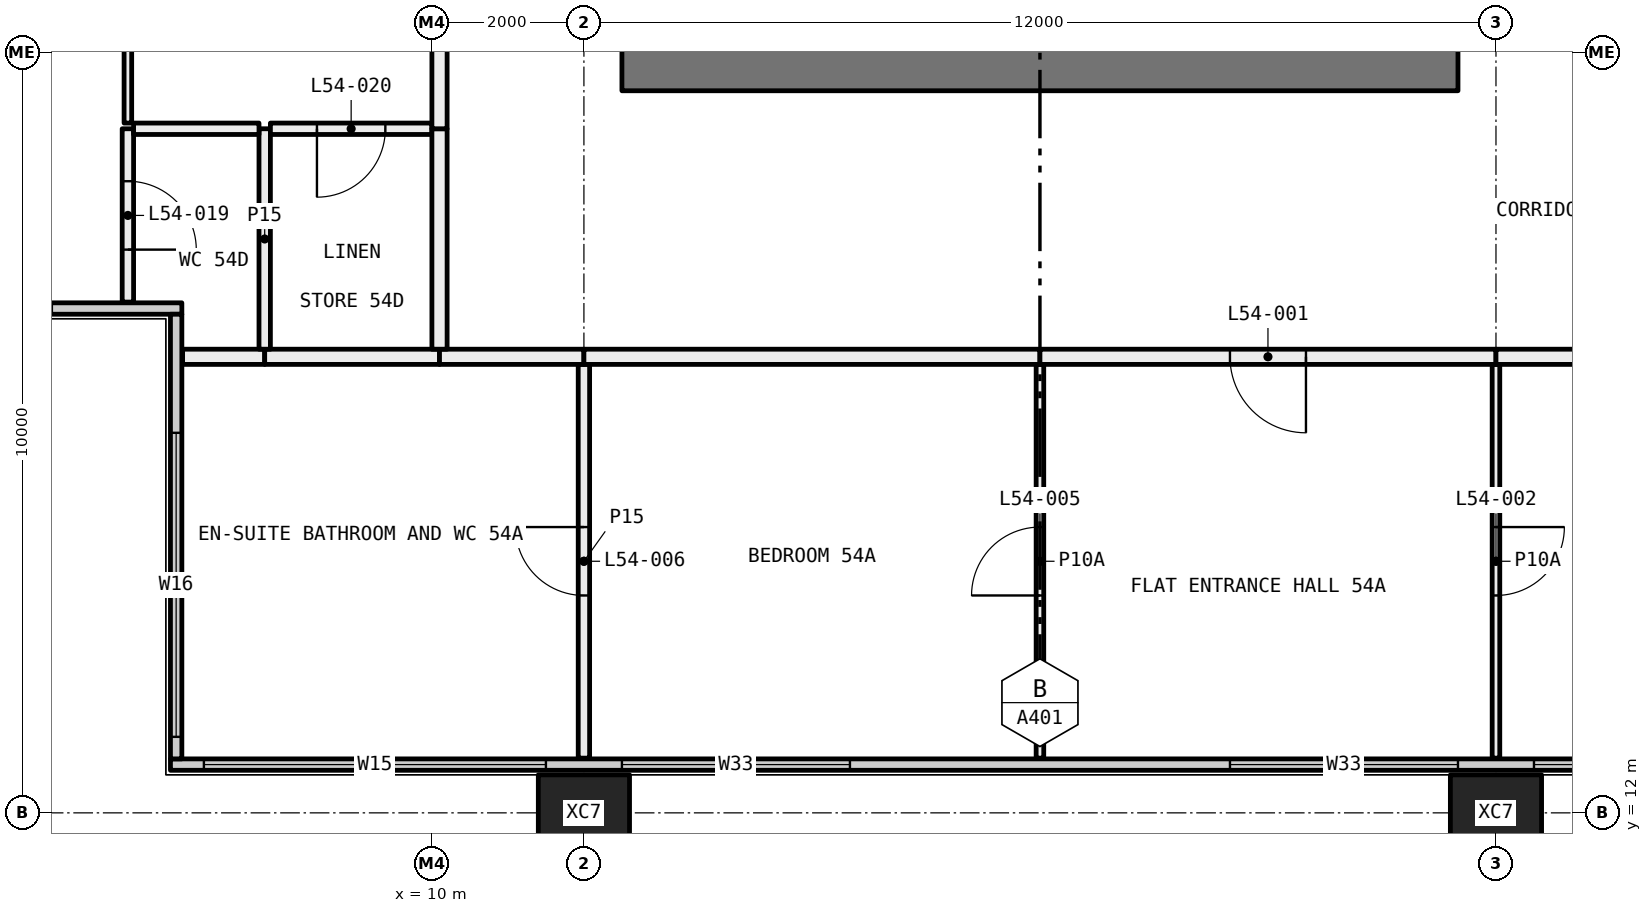
"""IFC4 building model, lengths in metres.
Left out: names, types, materials, properties, quantities, classifications, styles, units other than length and angle.
Written with IfcOpenShell. Run it as: python <this file> out.ifc"""

import sys

from ifc_helpers import new_model, si_unit, direction, frame, frame_2d, origin, origin_2d, place, context, subcontext, project, spatial, rectangle, hollow_rectangle, extrude, element, fill, save


model = new_model("IFC4")
c1 = context("Model", 3, precision=1e-05, world=origin(), true_north=direction((0.0, 1.0)))
c2 = subcontext(c1, "Body", "Model", "MODEL_VIEW")
j1 = project(units=[si_unit("LENGTHUNIT", "METRE"), si_unit("PLANEANGLEUNIT", "RADIAN")], contexts=[c1])
p1 = place(None, origin())
s1 = spatial("IfcSite", under=j1, at=p1, CompositionType="ELEMENT")
p2 = place(p1, origin())
s2 = spatial("IfcBuilding", under=s1, at=p2, CompositionType="ELEMENT")
p3 = place(p2, frame((0.0, 0.0, 203.1)))
s3 = spatial("IfcBuildingStorey", under=s2, at=p3, CompositionType="ELEMENT", Elevation=203.1)
for number, where, z_axis, x_axis in (
    (1, (12.0, 12.0, -0.4), (0.0, 0.0, 1.0), (1.0, 0.0, 0.0)),
    (2, (24.0, 12.0, -0.4), (0.0, 0.0, 1.0), (1.0, 0.0, 0.0)),
):
    element("IfcColumn", number, at=place(p3, frame(where, z_axis=z_axis, x_axis=x_axis)), inside=s3, PredefinedType="COLUMN", context=c2, shape_type="SweptSolid", body=[
        extrude(hollow_rectangle(XDim=1.2, YDim=1.0, WallThickness=0.045, at=origin_2d()), origin(), (0.0, 0.0, 1.0), 3.45),
    ])
p4 = place(p3, frame((6.56, 12.635, 0.0), z_axis=(0.0, 0.0, 1.0), x_axis=(1.0, 0.0, 0.0)))
e3 = element("IfcWall", 3, at=p4, inside=s3, PredefinedType="ELEMENTEDWALL", context=c2, shape_type="SweptSolid", body=[
    extrude(rectangle(XDim=46.88, YDim=0.15, at=frame_2d((23.44, 0.0))), origin(), (0.0, 0.0, 1.0), 3.05),
])
p5 = place(p4, frame((0.44, 0.0, 0.45)))
e4 = element("IfcOpeningElement", 4, at=p5, cuts=e3, PredefinedType="OPENING", context=c2, shape_type="SweptSolid", body=[
    extrude(rectangle(XDim=4.5, YDim=2.55, at=frame_2d((2.25, 1.275))), frame((0.0, 0.085, 0.0), z_axis=(0.0, -1.0, 0.0), x_axis=(1.0, 0.0, 0.0)), (0.0, 0.0, 1.0), 0.17),
])
p6 = place(p4, frame((5.94, 0.0, 0.45)))
e5 = element("IfcOpeningElement", 5, at=p6, cuts=e3, PredefinedType="OPENING", context=c2, shape_type="SweptSolid", body=[
    extrude(rectangle(XDim=3.0, YDim=2.55, at=frame_2d((1.5, 1.275))), frame((0.0, 0.085, 0.0), z_axis=(0.0, -1.0, 0.0), x_axis=(1.0, 0.0, 0.0)), (0.0, 0.0, 1.0), 0.17),
])
p7 = place(p4, frame((13.94, 0.0, 0.45)))
e6 = element("IfcOpeningElement", 6, at=p7, cuts=e3, PredefinedType="OPENING", context=c2, shape_type="SweptSolid", body=[
    extrude(rectangle(XDim=3.0, YDim=2.55, at=frame_2d((1.5, 1.275))), frame((0.0, 0.085, 0.0), z_axis=(0.0, -1.0, 0.0), x_axis=(1.0, 0.0, 0.0)), (0.0, 0.0, 1.0), 0.17),
])
p8 = place(p4, frame((17.94, 0.0, 0.45)))
e7 = element("IfcOpeningElement", 7, at=p8, cuts=e3, PredefinedType="OPENING", context=c2, shape_type="SweptSolid", body=[
    extrude(rectangle(XDim=3.0, YDim=2.55, at=frame_2d((1.5, 1.275))), frame((0.0, 0.085, 0.0), z_axis=(0.0, -1.0, 0.0), x_axis=(1.0, 0.0, 0.0)), (0.0, 0.0, 1.0), 0.17),
])
p9 = place(p4, frame((26.94, 0.0, 0.45)))
e8 = element("IfcOpeningElement", 8, at=p9, cuts=e3, PredefinedType="OPENING", context=c2, shape_type="SweptSolid", body=[
    extrude(rectangle(XDim=2.0, YDim=2.55, at=frame_2d((1.0, 1.275))), frame((0.0, 0.085, 0.0), z_axis=(0.0, -1.0, 0.0), x_axis=(1.0, 0.0, 0.0)), (0.0, 0.0, 1.0), 0.17),
])
p10 = place(p4, frame((29.94, 0.0, 0.45)))
e9 = element("IfcOpeningElement", 9, at=p10, cuts=e3, PredefinedType="OPENING", context=c2, shape_type="SweptSolid", body=[
    extrude(rectangle(XDim=3.0, YDim=2.55, at=frame_2d((1.5, 1.275))), frame((0.0, 0.085, 0.0), z_axis=(0.0, -1.0, 0.0), x_axis=(1.0, 0.0, 0.0)), (0.0, 0.0, 1.0), 0.17),
])
p11 = place(p4, frame((37.94, 0.0, 0.45)))
e10 = element("IfcOpeningElement", 10, at=p11, cuts=e3, PredefinedType="OPENING", context=c2, shape_type="SweptSolid", body=[
    extrude(rectangle(XDim=3.0, YDim=2.55, at=frame_2d((1.5, 1.275))), frame((0.0, 0.085, 0.0), z_axis=(0.0, -1.0, 0.0), x_axis=(1.0, 0.0, 0.0)), (0.0, 0.0, 1.0), 0.17),
])
p12 = place(p4, frame((41.94, 0.0, 0.45)))
e11 = element("IfcOpeningElement", 11, at=p12, cuts=e3, PredefinedType="OPENING", context=c2, shape_type="SweptSolid", body=[
    extrude(rectangle(XDim=4.5, YDim=2.55, at=frame_2d((2.25, 1.275))), frame((0.0, 0.085, 0.0), z_axis=(0.0, -1.0, 0.0), x_axis=(1.0, 0.0, 0.0)), (0.0, 0.0, 1.0), 0.17),
])
p13 = place(p3, frame((0.56, 18.635, 0.0), z_axis=(0.0, 0.0, 1.0), x_axis=(1.0, 0.0, 0.0)))
e12 = element("IfcWall", 12, at=p13, inside=s3, PredefinedType="ELEMENTEDWALL", context=c2, shape_type="SweptSolid", body=[
    extrude(rectangle(XDim=6.15, YDim=0.15, at=frame_2d((3.075, 0.0))), origin(), (0.0, 0.0, 1.0), 3.05),
])
p14 = place(p13, frame((0.44, 0.0, 0.45)))
e13 = element("IfcOpeningElement", 13, at=p14, cuts=e12, PredefinedType="OPENING", context=c2, shape_type="SweptSolid", body=[
    extrude(rectangle(XDim=4.0, YDim=2.55, at=frame_2d((2.0, 1.275))), frame((0.0, 0.085, 0.0), z_axis=(0.0, -1.0, 0.0), x_axis=(1.0, 0.0, 0.0)), (0.0, 0.0, 1.0), 0.17),
])
p15 = place(p3, frame((6.635, 12.71, 0.0), z_axis=(0.0, 0.0, 1.0), x_axis=(0.0, 1.0, 0.0)))
e14 = element("IfcWall", 14, at=p15, inside=s3, PredefinedType="ELEMENTEDWALL", context=c2, shape_type="SweptSolid", body=[
    extrude(rectangle(XDim=5.85, YDim=0.15, at=frame_2d((2.925, 0.0))), origin(), (0.0, 0.0, 1.0), 3.05),
])
p16 = place(p15, frame((0.29, 0.0, 0.45)))
e15 = element("IfcOpeningElement", 15, at=p16, cuts=e14, PredefinedType="OPENING", context=c2, shape_type="SweptSolid", body=[
    extrude(rectangle(XDim=4.0, YDim=2.55, at=frame_2d((2.0, 1.275))), frame((0.0, 0.085, 0.0), z_axis=(0.0, -1.0, 0.0), x_axis=(1.0, 0.0, 0.0)), (0.0, 0.0, 1.0), 0.17),
])
p17 = place(p3, frame((12.0, 12.72, 0.0), z_axis=(0.0, 0.0, 1.0), x_axis=(0.0, 1.0, 0.0)))
e16 = element("IfcWall", 16, at=p17, inside=s3, PredefinedType="PARTITIONING", context=c2, shape_type="SweptSolid", body=[
    extrude(rectangle(XDim=5.18, YDim=0.15, at=frame_2d((2.59, 0.0))), origin(), (0.0, 0.0, 1.0), 3.05),
])
p18 = place(p17, frame((2.14, 0.0, 0.0)))
e17 = element("IfcOpeningElement", 17, at=p18, cuts=e16, PredefinedType="OPENING", context=c2, shape_type="SweptSolid", body=[
    extrude(rectangle(XDim=0.9, YDim=2.1, at=frame_2d((0.45, 1.05))), frame((0.0, 0.085, 0.0), z_axis=(0.0, -1.0, 0.0), x_axis=(1.0, 0.0, 0.0)), (0.0, 0.0, 1.0), 0.17),
])
p19 = place(p3, frame((7.8, 18.0, 0.0), z_axis=(0.0, 0.0, 1.0), x_axis=(-1.0, 0.0, 0.0)))
e18 = element("IfcWall", 18, at=p19, inside=s3, PredefinedType="PARTITIONING", context=c2, shape_type="SweptSolid", body=[
    extrude(rectangle(XDim=1.08, YDim=0.2, at=frame_2d((0.54, 0.0))), origin(), (0.0, 0.0, 1.0), 3.05),
])
p20 = place(p3, frame((10.1, 18.0, 0.0), z_axis=(0.0, 0.0, 1.0), x_axis=(-1.0, 0.0, 0.0)))
e19 = element("IfcWall", 19, at=p20, inside=s3, PredefinedType="PARTITIONING", context=c2, shape_type="SweptSolid", body=[
    extrude(rectangle(XDim=2.3, YDim=0.2, at=frame_2d((1.15, 0.0))), origin(), (0.0, 0.0, 1.0), 3.05),
])
p21 = place(p3, frame((12.0, 18.0, 0.0), z_axis=(0.0, 0.0, 1.0), x_axis=(-1.0, 0.0, 0.0)))
e20 = element("IfcWall", 20, at=p21, inside=s3, PredefinedType="PARTITIONING", context=c2, shape_type="SweptSolid", body=[
    extrude(rectangle(XDim=1.9, YDim=0.2, at=frame_2d((0.95, 0.0))), origin(), (0.0, 0.0, 1.0), 3.05),
])
p22 = place(p3, frame((18.0, 12.72, 0.0), z_axis=(0.0, 0.0, 1.0), x_axis=(0.0, 1.0, 0.0)))
e21 = element("IfcWall", 21, at=p22, inside=s3, PredefinedType="PARTITIONING", context=c2, shape_type="SweptSolid", body=[
    extrude(rectangle(XDim=5.18, YDim=0.1, at=frame_2d((2.59, 0.0))), origin(), (0.0, 0.0, 1.0), 3.05),
])
p23 = place(p22, frame((2.14, 0.0, 0.0)))
e22 = element("IfcOpeningElement", 22, at=p23, cuts=e21, PredefinedType="OPENING", context=c2, shape_type="SweptSolid", body=[
    extrude(rectangle(XDim=0.9, YDim=2.1, at=frame_2d((0.45, 1.05))), frame((0.0, 0.06, 0.0), z_axis=(0.0, -1.0, 0.0), x_axis=(1.0, 0.0, 0.0)), (0.0, 0.0, 1.0), 0.12),
])
p24 = place(p3, frame((18.0, 18.0, 0.0), z_axis=(0.0, 0.0, 1.0), x_axis=(-1.0, 0.0, 0.0)))
e23 = element("IfcWall", 23, at=p24, inside=s3, PredefinedType="PARTITIONING", context=c2, shape_type="SweptSolid", body=[
    extrude(rectangle(XDim=6.0, YDim=0.2, at=frame_2d((3.0, 0.0))), origin(), (0.0, 0.0, 1.0), 3.05),
])
p25 = place(p3, frame((24.0, 12.72, 0.0), z_axis=(0.0, 0.0, 1.0), x_axis=(0.0, 1.0, 0.0)))
e24 = element("IfcWall", 24, at=p25, inside=s3, PredefinedType="PARTITIONING", context=c2, shape_type="SweptSolid", body=[
    extrude(rectangle(XDim=5.18, YDim=0.1, at=frame_2d((2.59, 0.0))), origin(), (0.0, 0.0, 1.0), 3.05),
])
p26 = place(p25, frame((2.14, 0.0, 0.0)))
e25 = element("IfcOpeningElement", 25, at=p26, cuts=e24, PredefinedType="OPENING", context=c2, shape_type="SweptSolid", body=[
    extrude(rectangle(XDim=0.9, YDim=2.1, at=frame_2d((0.45, 1.05))), frame((0.0, 0.06, 0.0), z_axis=(0.0, -1.0, 0.0), x_axis=(1.0, 0.0, 0.0)), (0.0, 0.0, 1.0), 0.12),
])
p27 = place(p3, frame((24.0, 18.0, 0.0), z_axis=(0.0, 0.0, 1.0), x_axis=(-1.0, 0.0, 0.0)))
e26 = element("IfcWall", 26, at=p27, inside=s3, PredefinedType="PARTITIONING", context=c2, shape_type="SweptSolid", body=[
    extrude(rectangle(XDim=6.0, YDim=0.2, at=frame_2d((3.0, 0.0))), origin(), (0.0, 0.0, 1.0), 3.05),
])
p28 = place(p27, frame((2.5, 0.0, 0.0)))
e27 = element("IfcOpeningElement", 27, at=p28, cuts=e26, PredefinedType="OPENING", context=c2, shape_type="SweptSolid", body=[
    extrude(rectangle(XDim=1.0, YDim=2.1, at=frame_2d((0.5, 1.05))), frame((0.0, 0.11, 0.0), z_axis=(0.0, -1.0, 0.0), x_axis=(1.0, 0.0, 0.0)), (0.0, 0.0, 1.0), 0.22),
])
p29 = place(p3, frame((36.0, 18.0, 0.0), z_axis=(0.0, 0.0, 1.0), x_axis=(-1.0, 0.0, 0.0)))
e28 = element("IfcWall", 28, at=p29, inside=s3, PredefinedType="PARTITIONING", context=c2, shape_type="SweptSolid", body=[
    extrude(rectangle(XDim=12.0, YDim=0.2, at=frame_2d((6.0, 0.0))), origin(), (0.0, 0.0, 1.0), 2.45),
])
p30 = place(p3, frame((6.0, 18.72, 0.0), z_axis=(0.0, 0.0, 1.0), x_axis=(0.0, 1.0, 0.0)))
e29 = element("IfcWall", 29, at=p30, inside=s3, PredefinedType="PARTITIONING", context=c2, shape_type="SweptSolid", body=[
    extrude(rectangle(XDim=2.28, YDim=0.15, at=frame_2d((1.14, 0.0))), origin(), (0.0, 0.0, 1.0), 3.05),
])
p31 = place(p30, frame((0.69, 0.0, 0.0)))
e30 = element("IfcOpeningElement", 30, at=p31, cuts=e29, PredefinedType="OPENING", context=c2, shape_type="SweptSolid", body=[
    extrude(rectangle(XDim=0.9, YDim=2.1, at=frame_2d((0.45, 1.05))), frame((0.0, 0.085, 0.0), z_axis=(0.0, -1.0, 0.0), x_axis=(1.0, 0.0, 0.0)), (0.0, 0.0, 1.0), 0.17),
])
p32 = place(p3, frame((6.0, 21.075, 0.0), z_axis=(0.0, 0.0, 1.0), x_axis=(0.0, 1.0, 0.0)))
e31 = element("IfcWall", 31, at=p32, inside=s3, PredefinedType="PARTITIONING", context=c2, shape_type="SweptSolid", body=[
    extrude(rectangle(XDim=3.025, YDim=0.1, at=frame_2d((1.513, 0.0))), origin(), (0.0, 0.0, 1.0), 2.45),
])
p33 = place(p3, frame((7.8, 18.1, 0.0), z_axis=(0.0, 0.0, 1.0), x_axis=(0.0, 1.0, 0.0)))
e32 = element("IfcWall", 32, at=p33, inside=s3, PredefinedType="PARTITIONING", context=c2, shape_type="SweptSolid", body=[
    extrude(rectangle(XDim=2.9, YDim=0.15, at=frame_2d((1.45, 0.0))), origin(), (0.0, 0.0, 1.0), 3.05),
])
p34 = place(p3, frame((7.725, 21.0, 0.0), z_axis=(0.0, 0.0, 1.0), x_axis=(-1.0, 0.0, 0.0)))
e33 = element("IfcWall", 33, at=p34, inside=s3, PredefinedType="PARTITIONING", context=c2, shape_type="SweptSolid", body=[
    extrude(rectangle(XDim=1.65, YDim=0.15, at=frame_2d((0.825, 0.0))), origin(), (0.0, 0.0, 1.0), 3.05),
])
p35 = place(p3, frame((10.0, 21.0, 0.0), z_axis=(0.0, 0.0, 1.0), x_axis=(-1.0, 0.0, 0.0)))
e34 = element("IfcWall", 34, at=p35, inside=s3, PredefinedType="PARTITIONING", context=c2, shape_type="SweptSolid", body=[
    extrude(rectangle(XDim=2.125, YDim=0.15, at=frame_2d((1.062, 0.0))), origin(), (0.0, 0.0, 1.0), 3.05),
])
p36 = place(p35, frame((0.613, 0.0, 0.0)))
e35 = element("IfcOpeningElement", 35, at=p36, cuts=e34, PredefinedType="OPENING", context=c2, shape_type="SweptSolid", body=[
    extrude(rectangle(XDim=0.9, YDim=2.1, at=frame_2d((0.45, 1.05))), frame((0.0, 0.085, 0.0), z_axis=(0.0, -1.0, 0.0), x_axis=(1.0, 0.0, 0.0)), (0.0, 0.0, 1.0), 0.17),
])
p37 = place(p3, frame((10.1, 18.1, 0.0), z_axis=(0.0, 0.0, 1.0), x_axis=(0.0, 1.0, 0.0)))
e36 = element("IfcWall", 36, at=p37, inside=s3, PredefinedType="PARTITIONING", context=c2, shape_type="SweptSolid", body=[
    extrude(rectangle(XDim=2.9, YDim=0.2, at=frame_2d((1.45, 0.0))), origin(), (0.0, 0.0, 1.0), 3.05),
])
p38 = place(p3, frame((10.1, 21.0, 0.0), z_axis=(0.0, 0.0, 1.0), x_axis=(0.0, 1.0, 0.0)))
e37 = element("IfcWall", 37, at=p38, inside=s3, PredefinedType="PARTITIONING", context=c2, shape_type="SweptSolid", body=[
    extrude(rectangle(XDim=3.1, YDim=0.2, at=frame_2d((1.55, 0.0))), origin(), (0.0, 0.0, 1.0), 2.45),
])
p39 = place(p3, frame((12.5, 21.775, 0.0), z_axis=(0.0, 0.0, 1.0), x_axis=(1.0, 0.0, 0.0)))
e38 = element("IfcWall", 38, at=p39, inside=s3, PredefinedType="SHEAR", context=c2, shape_type="SweptSolid", body=[
    extrude(rectangle(XDim=11.0, YDim=0.55, at=frame_2d((5.5, 0.0))), origin(), (0.0, 0.0, 1.0), 3.05),
])
p40 = place(p5, origin())
e39 = element("IfcWindow", 39, at=p40, inside=s3, PartitioningType="SINGLE_PANEL", PredefinedType="WINDOW", context=c2, shape_type="SweptSolid", body=[
    extrude(rectangle(XDim=4.5, YDim=2.55, at=frame_2d((2.25, 1.275))), frame((0.0, 0.03, 0.0), z_axis=(0.0, -1.0, 0.0), x_axis=(1.0, 0.0, 0.0)), (0.0, 0.0, 1.0), 0.06),
])
fill(e4, e39)
p41 = place(p6, origin())
e40 = element("IfcWindow", 40, at=p41, inside=s3, PartitioningType="SINGLE_PANEL", PredefinedType="WINDOW", context=c2, shape_type="SweptSolid", body=[
    extrude(rectangle(XDim=3.0, YDim=2.55, at=frame_2d((1.5, 1.275))), frame((0.0, 0.03, 0.0), z_axis=(0.0, -1.0, 0.0), x_axis=(1.0, 0.0, 0.0)), (0.0, 0.0, 1.0), 0.06),
])
fill(e5, e40)
p42 = place(p7, origin())
e41 = element("IfcWindow", 41, at=p42, inside=s3, PartitioningType="SINGLE_PANEL", PredefinedType="WINDOW", context=c2, shape_type="SweptSolid", body=[
    extrude(rectangle(XDim=3.0, YDim=2.55, at=frame_2d((1.5, 1.275))), frame((0.0, 0.03, 0.0), z_axis=(0.0, -1.0, 0.0), x_axis=(1.0, 0.0, 0.0)), (0.0, 0.0, 1.0), 0.06),
])
fill(e6, e41)
p43 = place(p8, origin())
e42 = element("IfcWindow", 42, at=p43, inside=s3, PartitioningType="SINGLE_PANEL", PredefinedType="WINDOW", context=c2, shape_type="SweptSolid", body=[
    extrude(rectangle(XDim=3.0, YDim=2.55, at=frame_2d((1.5, 1.275))), frame((0.0, 0.03, 0.0), z_axis=(0.0, -1.0, 0.0), x_axis=(1.0, 0.0, 0.0)), (0.0, 0.0, 1.0), 0.06),
])
fill(e7, e42)
p44 = place(p16, origin())
e43 = element("IfcWindow", 43, at=p44, inside=s3, PartitioningType="SINGLE_PANEL", PredefinedType="WINDOW", context=c2, shape_type="SweptSolid", body=[
    extrude(rectangle(XDim=4.0, YDim=2.55, at=frame_2d((2.0, 1.275))), frame((0.0, 0.03, 0.0), z_axis=(0.0, -1.0, 0.0), x_axis=(1.0, 0.0, 0.0)), (0.0, 0.0, 1.0), 0.06),
])
fill(e15, e43)
p45 = place(p28, origin())
e44 = element("IfcDoor", 44, at=p45, inside=s3, OperationType="SINGLE_SWING_RIGHT", PredefinedType="DOOR", context=c2, shape_type="SweptSolid", body=[
    extrude(rectangle(XDim=1.0, YDim=2.1, at=frame_2d((0.5, 1.05))), frame((0.0, 0.025, 0.0), z_axis=(0.0, -1.0, 0.0), x_axis=(1.0, 0.0, 0.0)), (0.0, 0.0, 1.0), 0.05),
])
fill(e27, e44)
p46 = place(p26, frame((0.9, 0.0, 0.0), x_axis=(-1.0, 0.0, 0.0)))
e45 = element("IfcDoor", 45, at=p46, inside=s3, OperationType="SINGLE_SWING_RIGHT", PredefinedType="DOOR", context=c2, shape_type="SweptSolid", body=[
    extrude(rectangle(XDim=0.9, YDim=2.1, at=frame_2d((0.45, 1.05))), frame((0.0, 0.025, 0.0), z_axis=(0.0, -1.0, 0.0), x_axis=(1.0, 0.0, 0.0)), (0.0, 0.0, 1.0), 0.05),
])
fill(e25, e45)
p47 = place(p23, origin())
e46 = element("IfcDoor", 46, at=p47, inside=s3, OperationType="SINGLE_SWING_RIGHT", PredefinedType="DOOR", context=c2, shape_type="SweptSolid", body=[
    extrude(rectangle(XDim=0.9, YDim=2.1, at=frame_2d((0.45, 1.05))), frame((0.0, 0.025, 0.0), z_axis=(0.0, -1.0, 0.0), x_axis=(1.0, 0.0, 0.0)), (0.0, 0.0, 1.0), 0.05),
])
fill(e22, e46)
p48 = place(p18, origin())
e47 = element("IfcDoor", 47, at=p48, inside=s3, OperationType="SINGLE_SWING_LEFT", PredefinedType="DOOR", context=c2, shape_type="SweptSolid", body=[
    extrude(rectangle(XDim=0.9, YDim=2.1, at=frame_2d((0.45, 1.05))), frame((0.0, 0.025, 0.0), z_axis=(0.0, -1.0, 0.0), x_axis=(1.0, 0.0, 0.0)), (0.0, 0.0, 1.0), 0.05),
])
fill(e17, e47)
p49 = place(p31, frame((0.9, 0.0, 0.0), x_axis=(-1.0, 0.0, 0.0)))
e48 = element("IfcDoor", 48, at=p49, inside=s3, OperationType="SINGLE_SWING_LEFT", PredefinedType="DOOR", context=c2, shape_type="SweptSolid", body=[
    extrude(rectangle(XDim=0.9, YDim=2.1, at=frame_2d((0.45, 1.05))), frame((0.0, 0.025, 0.0), z_axis=(0.0, -1.0, 0.0), x_axis=(1.0, 0.0, 0.0)), (0.0, 0.0, 1.0), 0.05),
])
fill(e30, e48)
p50 = place(p36, origin())
e49 = element("IfcDoor", 49, at=p50, inside=s3, OperationType="SINGLE_SWING_LEFT", PredefinedType="DOOR", context=c2, shape_type="SweptSolid", body=[
    extrude(rectangle(XDim=0.9, YDim=2.1, at=frame_2d((0.45, 1.05))), frame((0.0, 0.025, 0.0), z_axis=(0.0, -1.0, 0.0), x_axis=(1.0, 0.0, 0.0)), (0.0, 0.0, 1.0), 0.05),
])
fill(e35, e49)
save(model, sys.argv[1])
